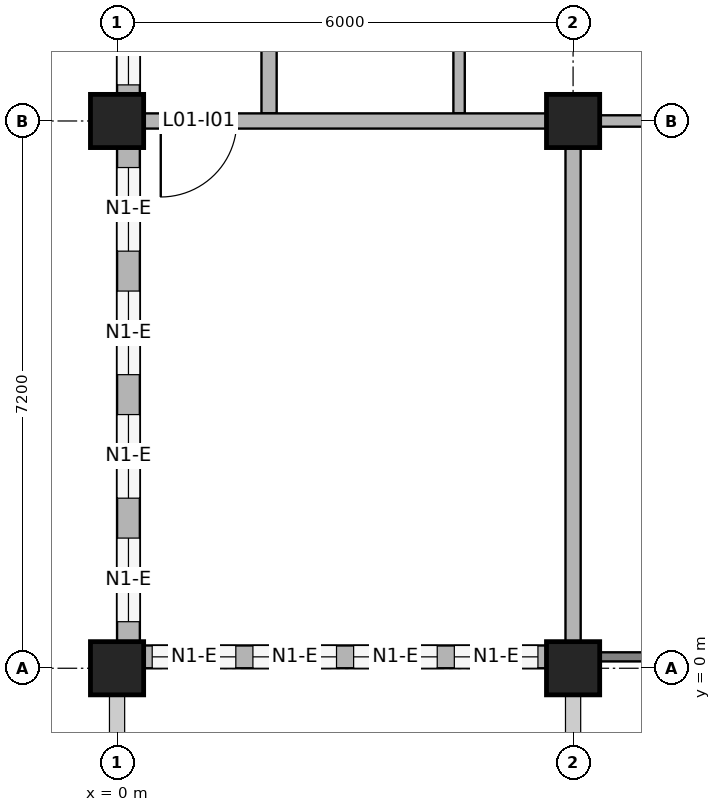
"""IFC4 building model, lengths in metres.
Left out: names, types, materials, properties, quantities, classifications, styles, units other than length and angle.
Written with IfcOpenShell. Run it as: python <this file> out.ifc"""

import sys

from ifc_helpers import new_model, si_unit, direction, frame, frame_2d, origin, origin_2d, place, context, subcontext, project, spatial, rectangle, extrude, element, fill, save


model = new_model("IFC4")
c1 = context("Model", 3, precision=1e-05, world=origin(), true_north=direction((0.0, 1.0)))
c2 = subcontext(c1, "Body", "Model", "MODEL_VIEW")
j1 = project(units=[si_unit("LENGTHUNIT", "METRE"), si_unit("PLANEANGLEUNIT", "RADIAN")], contexts=[c1])
p1 = place(None, origin())
s1 = spatial("IfcSite", under=j1, at=p1, CompositionType="ELEMENT")
p2 = place(p1, origin())
s2 = spatial("IfcBuilding", under=s1, at=p2, CompositionType="ELEMENT")
p3 = place(p2, frame((0.0, 0.0, 4.2)))
s3 = spatial("IfcBuildingStorey", under=s2, at=p3, CompositionType="ELEMENT", Elevation=4.2)
for number, where, z_axis, x_axis in (
    (1, (0.0, 0.0, 0.0), (0.0, 0.0, 1.0), (1.0, 0.0, 0.0)),
    (2, (6.0, 0.0, 0.0), (0.0, 0.0, 1.0), (1.0, 0.0, 0.0)),
    (3, (0.0, 7.2, 0.0), (0.0, 0.0, 1.0), (1.0, 0.0, 0.0)),
    (4, (6.0, 7.2, 0.0), (0.0, 0.0, 1.0), (1.0, 0.0, 0.0)),
):
    element("IfcColumn", number, at=place(p3, frame(where, z_axis=z_axis, x_axis=x_axis)), inside=s3, PredefinedType="COLUMN", context=c2, shape_type="SweptSolid", body=[
        extrude(rectangle(XDim=0.7, YDim=0.7, at=origin_2d()), origin(), (0.0, 0.0, 1.0), 3.95),
    ])
p4 = place(p3, frame((0.35, 0.15, 0.0), z_axis=(0.0, 0.0, 1.0), x_axis=(1.0, 0.0, 0.0)))
e5 = element("IfcWall", 5, at=p4, inside=s3, PredefinedType="SOLIDWALL", context=c2, shape_type="SweptSolid", body=[
    extrude(rectangle(XDim=5.3, YDim=0.3, at=frame_2d((2.65, 0.0))), origin(), (0.0, 0.0, 1.0), 3.15),
])
p5 = place(p4, frame((0.113, 0.0, 0.9)))
e6 = element("IfcOpeningElement", 6, at=p5, cuts=e5, PredefinedType="OPENING", context=c2, shape_type="SweptSolid", body=[
    extrude(rectangle(XDim=1.1, YDim=1.5, at=frame_2d((0.55, 0.75))), frame((0.0, 0.16, 0.0), z_axis=(0.0, -1.0, 0.0), x_axis=(1.0, 0.0, 0.0)), (0.0, 0.0, 1.0), 0.32),
])
p6 = place(p4, frame((1.438, 0.0, 0.9)))
e7 = element("IfcOpeningElement", 7, at=p6, cuts=e5, PredefinedType="OPENING", context=c2, shape_type="SweptSolid", body=[
    extrude(rectangle(XDim=1.1, YDim=1.5, at=frame_2d((0.55, 0.75))), frame((0.0, 0.16, 0.0), z_axis=(0.0, -1.0, 0.0), x_axis=(1.0, 0.0, 0.0)), (0.0, 0.0, 1.0), 0.32),
])
p7 = place(p4, frame((2.762, 0.0, 0.9)))
e8 = element("IfcOpeningElement", 8, at=p7, cuts=e5, PredefinedType="OPENING", context=c2, shape_type="SweptSolid", body=[
    extrude(rectangle(XDim=1.1, YDim=1.5, at=frame_2d((0.55, 0.75))), frame((0.0, 0.16, 0.0), z_axis=(0.0, -1.0, 0.0), x_axis=(1.0, 0.0, 0.0)), (0.0, 0.0, 1.0), 0.32),
])
p8 = place(p4, frame((4.087, 0.0, 0.9)))
e9 = element("IfcOpeningElement", 9, at=p8, cuts=e5, PredefinedType="OPENING", context=c2, shape_type="SweptSolid", body=[
    extrude(rectangle(XDim=1.1, YDim=1.5, at=frame_2d((0.55, 0.75))), frame((0.0, 0.16, 0.0), z_axis=(0.0, -1.0, 0.0), x_axis=(1.0, 0.0, 0.0)), (0.0, 0.0, 1.0), 0.32),
])
p9 = place(p3, frame((0.15, 0.35, 0.0), z_axis=(0.0, 0.0, 1.0), x_axis=(0.0, 1.0, 0.0)))
e10 = element("IfcWall", 10, at=p9, inside=s3, PredefinedType="SOLIDWALL", context=c2, shape_type="SweptSolid", body=[
    extrude(rectangle(XDim=6.5, YDim=0.3, at=frame_2d((3.25, 0.0))), origin(), (0.0, 0.0, 1.0), 3.05),
])
p10 = place(p9, frame((0.262, 0.0, 0.9)))
e11 = element("IfcOpeningElement", 11, at=p10, cuts=e10, PredefinedType="OPENING", context=c2, shape_type="SweptSolid", body=[
    extrude(rectangle(XDim=1.1, YDim=1.5, at=frame_2d((0.55, 0.75))), frame((0.0, 0.16, 0.0), z_axis=(0.0, -1.0, 0.0), x_axis=(1.0, 0.0, 0.0)), (0.0, 0.0, 1.0), 0.32),
])
p11 = place(p9, frame((1.887, 0.0, 0.9)))
e12 = element("IfcOpeningElement", 12, at=p11, cuts=e10, PredefinedType="OPENING", context=c2, shape_type="SweptSolid", body=[
    extrude(rectangle(XDim=1.1, YDim=1.5, at=frame_2d((0.55, 0.75))), frame((0.0, 0.16, 0.0), z_axis=(0.0, -1.0, 0.0), x_axis=(1.0, 0.0, 0.0)), (0.0, 0.0, 1.0), 0.32),
])
p12 = place(p9, frame((3.512, 0.0, 0.9)))
e13 = element("IfcOpeningElement", 13, at=p12, cuts=e10, PredefinedType="OPENING", context=c2, shape_type="SweptSolid", body=[
    extrude(rectangle(XDim=1.1, YDim=1.5, at=frame_2d((0.55, 0.75))), frame((0.0, 0.16, 0.0), z_axis=(0.0, -1.0, 0.0), x_axis=(1.0, 0.0, 0.0)), (0.0, 0.0, 1.0), 0.32),
])
p13 = place(p9, frame((5.137, 0.0, 0.9)))
e14 = element("IfcOpeningElement", 14, at=p13, cuts=e10, PredefinedType="OPENING", context=c2, shape_type="SweptSolid", body=[
    extrude(rectangle(XDim=1.1, YDim=1.5, at=frame_2d((0.55, 0.75))), frame((0.0, 0.16, 0.0), z_axis=(0.0, -1.0, 0.0), x_axis=(1.0, 0.0, 0.0)), (0.0, 0.0, 1.0), 0.32),
])
p14 = place(p3, frame((0.15, 7.55, 0.0), z_axis=(0.0, 0.0, 1.0), x_axis=(0.0, 1.0, 0.0)))
e15 = element("IfcWall", 15, at=p14, inside=s3, PredefinedType="SOLIDWALL", context=c2, shape_type="SweptSolid", body=[
    extrude(rectangle(XDim=6.85, YDim=0.3, at=frame_2d((3.425, 0.0))), origin(), (0.0, 0.0, 1.0), 3.05),
])
p15 = place(p14, frame((0.125, 0.0, 0.9)))
e16 = element("IfcOpeningElement", 16, at=p15, cuts=e15, PredefinedType="OPENING", context=c2, shape_type="SweptSolid", body=[
    extrude(rectangle(XDim=1.1, YDim=1.5, at=frame_2d((0.55, 0.75))), frame((0.0, 0.16, 0.0), z_axis=(0.0, -1.0, 0.0), x_axis=(1.0, 0.0, 0.0)), (0.0, 0.0, 1.0), 0.32),
])
p16 = place(p14, frame((1.475, 0.0, 0.9)))
e17 = element("IfcOpeningElement", 17, at=p16, cuts=e15, PredefinedType="OPENING", context=c2, shape_type="SweptSolid", body=[
    extrude(rectangle(XDim=1.1, YDim=1.5, at=frame_2d((0.55, 0.75))), frame((0.0, 0.16, 0.0), z_axis=(0.0, -1.0, 0.0), x_axis=(1.0, 0.0, 0.0)), (0.0, 0.0, 1.0), 0.32),
])
p17 = place(p14, frame((2.825, 0.0, 0.9)))
e18 = element("IfcOpeningElement", 18, at=p17, cuts=e15, PredefinedType="OPENING", context=c2, shape_type="SweptSolid", body=[
    extrude(rectangle(XDim=1.1, YDim=1.5, at=frame_2d((0.55, 0.75))), frame((0.0, 0.16, 0.0), z_axis=(0.0, -1.0, 0.0), x_axis=(1.0, 0.0, 0.0)), (0.0, 0.0, 1.0), 0.32),
])
p18 = place(p14, frame((4.175, 0.0, 0.9)))
e19 = element("IfcOpeningElement", 19, at=p18, cuts=e15, PredefinedType="OPENING", context=c2, shape_type="SweptSolid", body=[
    extrude(rectangle(XDim=1.1, YDim=1.5, at=frame_2d((0.55, 0.75))), frame((0.0, 0.16, 0.0), z_axis=(0.0, -1.0, 0.0), x_axis=(1.0, 0.0, 0.0)), (0.0, 0.0, 1.0), 0.32),
])
p19 = place(p14, frame((5.525, 0.0, 0.9)))
e20 = element("IfcOpeningElement", 20, at=p19, cuts=e15, PredefinedType="OPENING", context=c2, shape_type="SweptSolid", body=[
    extrude(rectangle(XDim=1.1, YDim=1.5, at=frame_2d((0.55, 0.75))), frame((0.0, 0.16, 0.0), z_axis=(0.0, -1.0, 0.0), x_axis=(1.0, 0.0, 0.0)), (0.0, 0.0, 1.0), 0.32),
])
p20 = place(p3, frame((2.0, 7.3, 0.0), z_axis=(0.0, 0.0, 1.0), x_axis=(0.0, 1.0, 0.0)))
e21 = element("IfcWall", 21, at=p20, inside=s3, PredefinedType="PARTITIONING", context=c2, shape_type="SweptSolid", body=[
    extrude(rectangle(XDim=5.2, YDim=0.2, at=frame_2d((2.6, 0.0))), origin(), (0.0, 0.0, 1.0), 3.15),
])
p21 = place(p20, frame((2.05, 0.0, 0.0)))
e22 = element("IfcOpeningElement", 22, at=p21, cuts=e21, PredefinedType="OPENING", context=c2, shape_type="SweptSolid", body=[
    extrude(rectangle(XDim=1.0, YDim=2.1, at=frame_2d((0.5, 1.05))), frame((0.0, 0.11, 0.0), z_axis=(0.0, -1.0, 0.0), x_axis=(1.0, 0.0, 0.0)), (0.0, 0.0, 1.0), 0.22),
])
p22 = place(p3, frame((4.5, 7.3, 0.0), z_axis=(0.0, 0.0, 1.0), x_axis=(0.0, 1.0, 0.0)))
e23 = element("IfcWall", 23, at=p22, inside=s3, PredefinedType="PARTITIONING", context=c2, shape_type="SweptSolid", body=[
    extrude(rectangle(XDim=5.0, YDim=0.15, at=frame_2d((2.5, 0.0))), origin(), (0.0, 0.0, 1.0), 3.15),
])
p23 = place(p3, frame((6.0, 0.15, 0.0), z_axis=(0.0, 0.0, 1.0), x_axis=(0.0, 1.0, 0.0)))
e24 = element("IfcWall", 24, at=p23, inside=s3, PredefinedType="PARTITIONING", context=c2, shape_type="SweptSolid", body=[
    extrude(rectangle(XDim=7.15, YDim=0.2, at=frame_2d((3.575, 0.0))), origin(), (0.0, 0.0, 1.0), 3.05),
])
p24 = place(p3, frame((0.15, 7.2, 0.0), z_axis=(0.0, 0.0, 1.0), x_axis=(1.0, 0.0, 0.0)))
e25 = element("IfcWall", 25, at=p24, inside=s3, PredefinedType="PARTITIONING", context=c2, shape_type="SweptSolid", body=[
    extrude(rectangle(XDim=5.75, YDim=0.2, at=frame_2d((2.875, 0.0))), origin(), (0.0, 0.0, 1.0), 3.15),
])
p25 = place(p24, frame((0.425, 0.0, 0.0)))
e26 = element("IfcOpeningElement", 26, at=p25, cuts=e25, PredefinedType="OPENING", context=c2, shape_type="SweptSolid", body=[
    extrude(rectangle(XDim=1.0, YDim=2.1, at=frame_2d((0.5, 1.05))), frame((0.0, 0.11, 0.0), z_axis=(0.0, -1.0, 0.0), x_axis=(1.0, 0.0, 0.0)), (0.0, 0.0, 1.0), 0.22),
])
p26 = place(p3, frame((6.35, 7.2, 0.0), z_axis=(0.0, 0.0, 1.0), x_axis=(1.0, 0.0, 0.0)))
e27 = element("IfcWall", 27, at=p26, inside=s3, PredefinedType="PARTITIONING", context=c2, shape_type="SweptSolid", body=[
    extrude(rectangle(XDim=5.55, YDim=0.15, at=frame_2d((2.775, 0.0))), origin(), (0.0, 0.0, 1.0), 3.05),
])
p27 = place(p5, origin())
e28 = element("IfcWindow", 28, at=p27, inside=s3, PartitioningType="SINGLE_PANEL", PredefinedType="WINDOW", context=c2, shape_type="SweptSolid", body=[
    extrude(rectangle(XDim=1.1, YDim=1.5, at=frame_2d((0.55, 0.75))), frame((0.0, 0.03, 0.0), z_axis=(0.0, -1.0, 0.0), x_axis=(1.0, 0.0, 0.0)), (0.0, 0.0, 1.0), 0.06),
])
fill(e6, e28)
p28 = place(p6, origin())
e29 = element("IfcWindow", 29, at=p28, inside=s3, PartitioningType="SINGLE_PANEL", PredefinedType="WINDOW", context=c2, shape_type="SweptSolid", body=[
    extrude(rectangle(XDim=1.1, YDim=1.5, at=frame_2d((0.55, 0.75))), frame((0.0, 0.03, 0.0), z_axis=(0.0, -1.0, 0.0), x_axis=(1.0, 0.0, 0.0)), (0.0, 0.0, 1.0), 0.06),
])
fill(e7, e29)
p29 = place(p7, origin())
e30 = element("IfcWindow", 30, at=p29, inside=s3, PartitioningType="SINGLE_PANEL", PredefinedType="WINDOW", context=c2, shape_type="SweptSolid", body=[
    extrude(rectangle(XDim=1.1, YDim=1.5, at=frame_2d((0.55, 0.75))), frame((0.0, 0.03, 0.0), z_axis=(0.0, -1.0, 0.0), x_axis=(1.0, 0.0, 0.0)), (0.0, 0.0, 1.0), 0.06),
])
fill(e8, e30)
p30 = place(p8, origin())
e31 = element("IfcWindow", 31, at=p30, inside=s3, PartitioningType="SINGLE_PANEL", PredefinedType="WINDOW", context=c2, shape_type="SweptSolid", body=[
    extrude(rectangle(XDim=1.1, YDim=1.5, at=frame_2d((0.55, 0.75))), frame((0.0, 0.03, 0.0), z_axis=(0.0, -1.0, 0.0), x_axis=(1.0, 0.0, 0.0)), (0.0, 0.0, 1.0), 0.06),
])
fill(e9, e31)
p31 = place(p10, origin())
e32 = element("IfcWindow", 32, at=p31, inside=s3, PartitioningType="SINGLE_PANEL", PredefinedType="WINDOW", context=c2, shape_type="SweptSolid", body=[
    extrude(rectangle(XDim=1.1, YDim=1.5, at=frame_2d((0.55, 0.75))), frame((0.0, 0.03, 0.0), z_axis=(0.0, -1.0, 0.0), x_axis=(1.0, 0.0, 0.0)), (0.0, 0.0, 1.0), 0.06),
])
fill(e11, e32)
p32 = place(p11, origin())
e33 = element("IfcWindow", 33, at=p32, inside=s3, PartitioningType="SINGLE_PANEL", PredefinedType="WINDOW", context=c2, shape_type="SweptSolid", body=[
    extrude(rectangle(XDim=1.1, YDim=1.5, at=frame_2d((0.55, 0.75))), frame((0.0, 0.03, 0.0), z_axis=(0.0, -1.0, 0.0), x_axis=(1.0, 0.0, 0.0)), (0.0, 0.0, 1.0), 0.06),
])
fill(e12, e33)
p33 = place(p12, origin())
e34 = element("IfcWindow", 34, at=p33, inside=s3, PartitioningType="SINGLE_PANEL", PredefinedType="WINDOW", context=c2, shape_type="SweptSolid", body=[
    extrude(rectangle(XDim=1.1, YDim=1.5, at=frame_2d((0.55, 0.75))), frame((0.0, 0.03, 0.0), z_axis=(0.0, -1.0, 0.0), x_axis=(1.0, 0.0, 0.0)), (0.0, 0.0, 1.0), 0.06),
])
fill(e13, e34)
p34 = place(p13, origin())
e35 = element("IfcWindow", 35, at=p34, inside=s3, PartitioningType="SINGLE_PANEL", PredefinedType="WINDOW", context=c2, shape_type="SweptSolid", body=[
    extrude(rectangle(XDim=1.1, YDim=1.5, at=frame_2d((0.55, 0.75))), frame((0.0, 0.03, 0.0), z_axis=(0.0, -1.0, 0.0), x_axis=(1.0, 0.0, 0.0)), (0.0, 0.0, 1.0), 0.06),
])
fill(e14, e35)
p35 = place(p15, origin())
e36 = element("IfcWindow", 36, at=p35, inside=s3, PartitioningType="SINGLE_PANEL", PredefinedType="WINDOW", context=c2, shape_type="SweptSolid", body=[
    extrude(rectangle(XDim=1.1, YDim=1.5, at=frame_2d((0.55, 0.75))), frame((0.0, 0.03, 0.0), z_axis=(0.0, -1.0, 0.0), x_axis=(1.0, 0.0, 0.0)), (0.0, 0.0, 1.0), 0.06),
])
fill(e16, e36)
p36 = place(p25, frame((1.0, 0.0, 0.0), z_axis=(0.0, 0.0, 1.0), x_axis=(-1.0, 0.0, 0.0)))
e37 = element("IfcDoor", 37, at=p36, inside=s3, OperationType="SINGLE_SWING_RIGHT", PredefinedType="DOOR", context=c2, shape_type="SweptSolid", body=[
    extrude(rectangle(XDim=1.0, YDim=2.1, at=frame_2d((0.5, 1.05))), frame((0.0, 0.025, 0.0), z_axis=(0.0, -1.0, 0.0), x_axis=(1.0, 0.0, 0.0)), (0.0, 0.0, 1.0), 0.05),
])
fill(e26, e37)
save(model, sys.argv[1])
